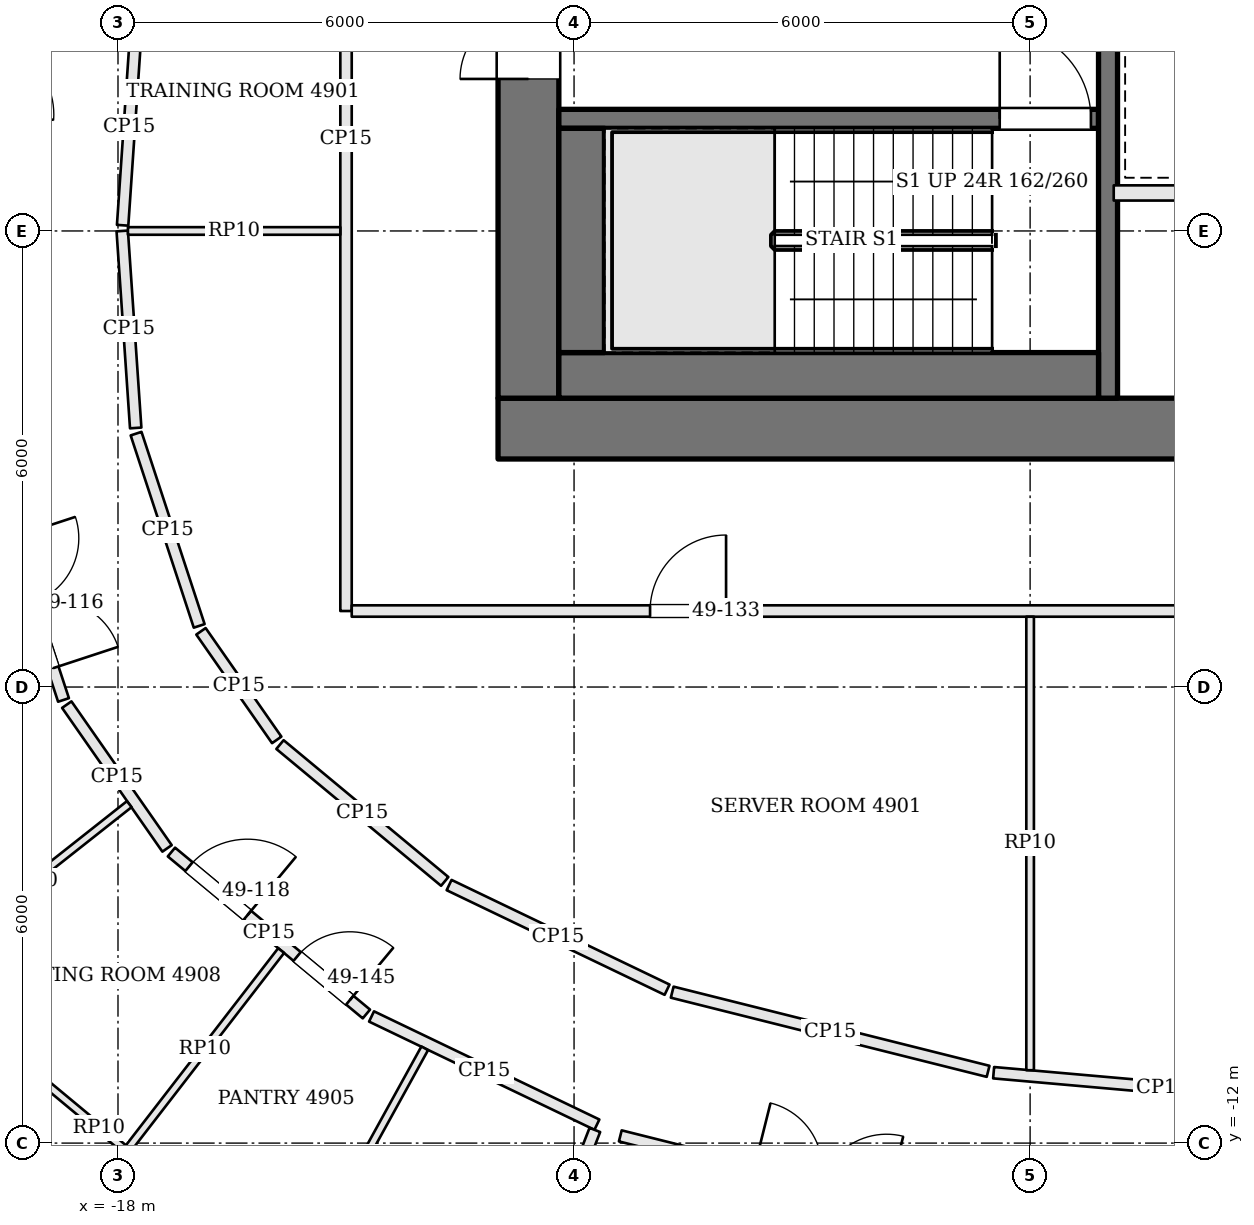
"""IFC4 building model, lengths in metres.
Left out: names, types, materials, properties, quantities, classifications, styles, units other than length and angle.
Written with IfcOpenShell. Run it as: python <this file> out.ifc"""

import sys

from ifc_helpers import new_model, si_unit, direction, frame, frame_2d, origin, place, context, subcontext, project, spatial, rectangle, extrude, element, fill, save


model = new_model("IFC4")
c1 = context("Model", 3, precision=1e-05, world=origin(), true_north=direction((0.0, 1.0)))
c2 = subcontext(c1, "Body", "Model", "MODEL_VIEW")
j1 = project(units=[si_unit("LENGTHUNIT", "METRE"), si_unit("PLANEANGLEUNIT", "RADIAN")], contexts=[c1])
p1 = place(None, origin())
s1 = spatial("IfcSite", under=j1, at=p1, CompositionType="ELEMENT")
p2 = place(p1, origin())
s2 = spatial("IfcBuilding", under=s1, at=p2, CompositionType="ELEMENT")
p3 = place(p2, frame((0.0, 0.0, 201.3)))
s3 = spatial("IfcBuildingStorey", under=s2, at=p3, CompositionType="ELEMENT", Elevation=201.3)
p4 = place(p3, frame((-13.0, -2.6, 0.0), z_axis=(0.0, 0.0, 1.0), x_axis=(1.0, 0.0, 0.0)))
e1 = element("IfcWall", 1, at=p4, inside=s3, PredefinedType="SHEAR", context=c2, shape_type="SweptSolid", body=[
    extrude(rectangle(XDim=26.0, YDim=0.8, at=frame_2d((13.0, 0.0))), origin(), (0.0, 0.0, 1.0), 3.9),
])
p5 = place(p4, frame((9.2, 0.0, 0.0)))
e2 = element("IfcOpeningElement", 2, at=p5, cuts=e1, PredefinedType="OPENING", context=c2, shape_type="SweptSolid", body=[
    extrude(rectangle(XDim=0.9, YDim=2.1, at=frame_2d((0.45, 1.05))), frame((0.0, 0.41, 0.0), z_axis=(0.0, -1.0, 0.0), x_axis=(1.0, 0.0, 0.0)), (0.0, 0.0, 1.0), 0.82),
])
p6 = place(p4, frame((12.3, 0.0, 0.0)))
e3 = element("IfcOpeningElement", 3, at=p6, cuts=e1, PredefinedType="OPENING", context=c2, shape_type="SweptSolid", body=[
    extrude(rectangle(XDim=0.9, YDim=2.1, at=frame_2d((0.45, 1.05))), frame((0.0, 0.41, 0.0), z_axis=(0.0, -1.0, 0.0), x_axis=(1.0, 0.0, 0.0)), (0.0, 0.0, 1.0), 0.82),
])
p7 = place(p4, frame((14.7, 0.0, 0.0)))
e4 = element("IfcOpeningElement", 4, at=p7, cuts=e1, PredefinedType="OPENING", context=c2, shape_type="SweptSolid", body=[
    extrude(rectangle(XDim=1.0, YDim=2.1, at=frame_2d((0.5, 1.05))), frame((0.0, 0.41, 0.0), z_axis=(0.0, -1.0, 0.0), x_axis=(1.0, 0.0, 0.0)), (0.0, 0.0, 1.0), 0.82),
])
p8 = place(p4, frame((16.55, 0.0, 0.0)))
e5 = element("IfcOpeningElement", 5, at=p8, cuts=e1, PredefinedType="OPENING", context=c2, shape_type="SweptSolid", body=[
    extrude(rectangle(XDim=0.9, YDim=2.1, at=frame_2d((0.45, 1.05))), frame((0.0, 0.41, 0.0), z_axis=(0.0, -1.0, 0.0), x_axis=(1.0, 0.0, 0.0)), (0.0, 0.0, 1.0), 0.82),
])
p9 = place(p3, frame((-12.6, -2.2, 0.0), z_axis=(0.0, 0.0, 1.0), x_axis=(0.0, 1.0, 0.0)))
e6 = element("IfcWall", 6, at=p9, inside=s3, PredefinedType="SHEAR", context=c2, shape_type="SweptSolid", body=[
    extrude(rectangle(XDim=13.4, YDim=0.8, at=frame_2d((6.7, 0.0))), origin(), (0.0, 0.0, 1.0), 3.9),
])
p10 = place(p9, frame((4.2, 0.0, 0.0)))
e7 = element("IfcOpeningElement", 7, at=p10, cuts=e6, PredefinedType="OPENING", context=c2, shape_type="SweptSolid", body=[
    extrude(rectangle(XDim=1.8, YDim=2.1, at=frame_2d((0.9, 1.05))), frame((0.0, 0.41, 0.0), z_axis=(0.0, -1.0, 0.0), x_axis=(1.0, 0.0, 0.0)), (0.0, 0.0, 1.0), 0.82),
])
p11 = place(p3, frame((-12.2, 1.475, 0.0), z_axis=(0.0, 0.0, 1.0), x_axis=(1.0, 0.0, 0.0)))
e8 = element("IfcWall", 8, at=p11, inside=s3, PredefinedType="SOLIDWALL", context=c2, shape_type="SweptSolid", body=[
    extrude(rectangle(XDim=7.1, YDim=0.25, at=frame_2d((3.55, 0.0))), origin(), (0.0, 0.0, 1.0), 3.7),
])
p12 = place(p11, frame((5.8, 0.0, 0.0)))
e9 = element("IfcOpeningElement", 9, at=p12, cuts=e8, PredefinedType="OPENING", context=c2, shape_type="SweptSolid", body=[
    extrude(rectangle(XDim=1.2, YDim=2.1, at=frame_2d((0.6, 1.05))), frame((0.0, 0.135, 0.0), z_axis=(0.0, -1.0, 0.0), x_axis=(1.0, 0.0, 0.0)), (0.0, 0.0, 1.0), 0.27),
])
p13 = place(p3, frame((-4.975, -2.2, 0.0), z_axis=(0.0, 0.0, 1.0), x_axis=(0.0, 1.0, 0.0)))
e10 = element("IfcWall", 10, at=p13, inside=s3, PredefinedType="SOLIDWALL", context=c2, shape_type="SweptSolid", body=[
    extrude(rectangle(XDim=13.4, YDim=0.25, at=frame_2d((6.7, 0.0))), origin(), (0.0, 0.0, 1.0), 3.7),
])
p14 = place(p13, frame((5.25, 0.0, 0.0)))
e11 = element("IfcOpeningElement", 11, at=p14, cuts=e10, PredefinedType="OPENING", context=c2, shape_type="SweptSolid", body=[
    extrude(rectangle(XDim=1.2, YDim=2.1, at=frame_2d((0.6, 1.05))), frame((0.0, 0.135, 0.0), z_axis=(0.0, -1.0, 0.0), x_axis=(1.0, 0.0, 0.0)), (0.0, 0.0, 1.0), 0.27),
])
p15 = place(p3, frame((-12.2, -1.9, 0.0), z_axis=(0.0, 0.0, 1.0), x_axis=(1.0, 0.0, 0.0)))
e12 = element("IfcWall", 12, at=p15, inside=s3, PredefinedType="SOLIDWALL", context=c2, shape_type="SweptSolid", body=[
    extrude(rectangle(XDim=7.1, YDim=0.6, at=frame_2d((3.55, 0.0))), origin(), (0.0, 0.0, 1.0), 3.7),
])
p16 = place(p3, frame((-11.9, -1.6, 0.0), z_axis=(0.0, 0.0, 1.0), x_axis=(0.0, 1.0, 0.0)))
e13 = element("IfcWall", 13, at=p16, inside=s3, PredefinedType="SOLIDWALL", context=c2, shape_type="SweptSolid", body=[
    extrude(rectangle(XDim=2.95, YDim=0.6, at=frame_2d((1.475, 0.0))), origin(), (0.0, 0.0, 1.0), 3.7),
])
p17 = place(p3, frame((-4.9, 0.5, 0.0), z_axis=(0.0, 0.0, 1.0), x_axis=(1.0, 0.0, 0.0)))
e14 = element("IfcWall", 14, at=p17, inside=s3, PredefinedType="SOLIDWALL", context=c2, shape_type="SweptSolid", body=[
    extrude(rectangle(XDim=9.8, YDim=0.2, at=frame_2d((4.9, 0.0))), origin(), (0.0, 0.0, 1.0), 3.7),
])
p18 = place(p3, frame((-19.712, -3.139, 0.0), z_axis=(0.0, 0.0, 1.0), x_axis=(0.311953946036, -0.950097224263, 0.0)))
e15 = element("IfcWall", 15, at=p18, inside=s3, PredefinedType="PARTITIONING", context=c2, shape_type="SweptSolid", body=[
    extrude(rectangle(XDim=3.19, YDim=0.15, at=frame_2d((1.595, 0.0))), origin(), (0.0, 0.0, 1.0), 3.084),
])
p19 = place(p18, frame((0.95, 0.0, 0.0)))
e16 = element("IfcOpeningElement", 16, at=p19, cuts=e15, PredefinedType="OPENING", context=c2, shape_type="SweptSolid", body=[
    extrude(rectangle(XDim=1.8, YDim=2.1, at=frame_2d((0.9, 1.05))), frame((0.0, 0.085, 0.0), z_axis=(0.0, -1.0, 0.0), x_axis=(1.0, 0.0, 0.0)), (0.0, 0.0, 1.0), 0.17),
])
p20 = place(p3, frame((-18.674, -6.232, 0.0), z_axis=(0.0, 0.0, 1.0), x_axis=(0.572118665737, -0.820170855563, 0.0)))
e17 = element("IfcWall", 17, at=p20, inside=s3, PredefinedType="PARTITIONING", context=c2, shape_type="SweptSolid", body=[
    extrude(rectangle(XDim=2.306, YDim=0.15, at=frame_2d((1.153, 0.0))), origin(), (0.0, 0.0, 1.0), 3.084),
])
p21 = place(p3, frame((-17.297, -8.171, 0.0), z_axis=(0.0, 0.0, 1.0), x_axis=(0.769228575061, -0.638973707839, 0.0)))
e18 = element("IfcWall", 18, at=p21, inside=s3, PredefinedType="PARTITIONING", context=c2, shape_type="SweptSolid", body=[
    extrude(rectangle(XDim=3.334, YDim=0.15, at=frame_2d((1.667, 0.0))), origin(), (0.0, 0.0, 1.0), 3.084),
])
p22 = place(p21, frame((0.3, 0.0, 0.0)))
e19 = element("IfcOpeningElement", 19, at=p22, cuts=e18, PredefinedType="OPENING", context=c2, shape_type="SweptSolid", body=[
    extrude(rectangle(XDim=1.0, YDim=2.4, at=frame_2d((0.5, 1.2))), frame((0.0, 0.085, 0.0), z_axis=(0.0, -1.0, 0.0), x_axis=(1.0, 0.0, 0.0)), (0.0, 0.0, 1.0), 0.17),
])
p23 = place(p21, frame((2.15, 0.0, 0.0)))
e20 = element("IfcOpeningElement", 20, at=p23, cuts=e18, PredefinedType="OPENING", context=c2, shape_type="SweptSolid", body=[
    extrude(rectangle(XDim=0.9, YDim=2.1, at=frame_2d((0.45, 1.05))), frame((0.0, 0.085, 0.0), z_axis=(0.0, -1.0, 0.0), x_axis=(1.0, 0.0, 0.0)), (0.0, 0.0, 1.0), 0.17),
])
p24 = place(p3, frame((-14.664, -10.334, 0.0), z_axis=(0.0, 0.0, 1.0), x_axis=(0.901511473943, -0.432755199101, 0.0)))
e21 = element("IfcWall", 21, at=p24, inside=s3, PredefinedType="PARTITIONING", context=c2, shape_type="SweptSolid", body=[
    extrude(rectangle(XDim=3.289, YDim=0.15, at=frame_2d((1.645, 0.0))), origin(), (0.0, 0.0, 1.0), 3.084),
])
p25 = place(p3, frame((-15.115, -20.562, 0.0), z_axis=(0.0, 0.0, 1.0), x_axis=(0.361729399691, 0.932283133709, 0.0)))
e22 = element("IfcWall", 22, at=p25, inside=s3, PredefinedType="PARTITIONING", context=c2, shape_type="SweptSolid", body=[
    extrude(rectangle(XDim=9.369, YDim=0.15, at=frame_2d((4.685, 0.0))), origin(), (0.0, 0.0, 1.0), 3.084),
])
p26 = place(p3, frame((-11.392, -11.905, 0.0), z_axis=(0.0, 0.0, 1.0), x_axis=(0.970002383823, -0.243095403859, 0.0)))
e23 = element("IfcWall", 23, at=p26, inside=s3, PredefinedType="PARTITIONING", context=c2, shape_type="SweptSolid", body=[
    extrude(rectangle(XDim=4.72, YDim=0.15, at=frame_2d((2.36, 0.0))), origin(), (0.0, 0.0, 1.0), 3.084),
])
p27 = place(p26, frame((1.812, 0.0, 0.0)))
e24 = element("IfcOpeningElement", 24, at=p27, cuts=e23, PredefinedType="OPENING", context=c2, shape_type="SweptSolid", body=[
    extrude(rectangle(XDim=1.8, YDim=2.1, at=frame_2d((0.9, 1.05))), frame((0.0, 0.085, 0.0), z_axis=(0.0, -1.0, 0.0), x_axis=(1.0, 0.0, 0.0)), (0.0, 0.0, 1.0), 0.17),
])
p28 = place(p3, frame((-2.039, -11.465, 0.0), z_axis=(0.0, 0.0, 1.0), x_axis=(-0.996139855484, 0.087780341286, 0.0)))
e25 = element("IfcWall", 25, at=p28, inside=s3, PredefinedType="PARTITIONING", context=c2, shape_type="SweptSolid", body=[
    extrude(rectangle(XDim=4.458, YDim=0.15, at=frame_2d((2.229, 0.0))), origin(), (0.0, 0.0, 1.0), 3.084),
])
p29 = place(p3, frame((-6.553, -11.056, 0.0), z_axis=(0.0, 0.0, 1.0), x_axis=(-0.970004917182, 0.243085294995, 0.0)))
e26 = element("IfcWall", 26, at=p29, inside=s3, PredefinedType="PARTITIONING", context=c2, shape_type="SweptSolid", body=[
    extrude(rectangle(XDim=4.284, YDim=0.15, at=frame_2d((2.142, 0.0))), origin(), (0.0, 0.0, 1.0), 3.084),
])
p30 = place(p3, frame((-10.776, -9.982, 0.0), z_axis=(0.0, 0.0, 1.0), x_axis=(-0.901511079436, 0.432756020933, 0.0)))
e27 = element("IfcWall", 27, at=p30, inside=s3, PredefinedType="PARTITIONING", context=c2, shape_type="SweptSolid", body=[
    extrude(rectangle(XDim=3.181, YDim=0.15, at=frame_2d((1.59, 0.0))), origin(), (0.0, 0.0, 1.0), 3.084),
])
p31 = place(p3, frame((-13.702, -8.557, 0.0), z_axis=(0.0, 0.0, 1.0), x_axis=(-0.769221825067, 0.638981833733, 0.0)))
e28 = element("IfcWall", 28, at=p31, inside=s3, PredefinedType="PARTITIONING", context=c2, shape_type="SweptSolid", body=[
    extrude(rectangle(XDim=2.817, YDim=0.15, at=frame_2d((1.409, 0.0))), origin(), (0.0, 0.0, 1.0), 3.084),
])
p32 = place(p3, frame((-15.912, -6.696, 0.0), z_axis=(0.0, 0.0, 1.0), x_axis=(-0.572078533763, 0.820198848578, 0.0)))
e29 = element("IfcWall", 29, at=p32, inside=s3, PredefinedType="PARTITIONING", context=c2, shape_type="SweptSolid", body=[
    extrude(rectangle(XDim=1.742, YDim=0.15, at=frame_2d((0.871, 0.0))), origin(), (0.0, 0.0, 1.0), 3.084),
])
p33 = place(p3, frame((-16.932, -5.196, 0.0), z_axis=(0.0, 0.0, 1.0), x_axis=(-0.311904957484, 0.950113307715, 0.0)))
e30 = element("IfcWall", 30, at=p33, inside=s3, PredefinedType="PARTITIONING", context=c2, shape_type="SweptSolid", body=[
    extrude(rectangle(XDim=2.662, YDim=0.15, at=frame_2d((1.331, 0.0))), origin(), (0.0, 0.0, 1.0), 3.084),
])
p34 = place(p3, frame((-17.767, -2.592, 0.0), z_axis=(0.0, 0.0, 1.0), x_axis=(-0.068140828228, 0.997675712608, 0.0)))
e31 = element("IfcWall", 31, at=p34, inside=s3, PredefinedType="PARTITIONING", context=c2, shape_type="SweptSolid", body=[
    extrude(rectangle(XDim=2.598, YDim=0.15, at=frame_2d((1.299, 0.0))), origin(), (0.0, 0.0, 1.0), 3.084),
])
p35 = place(p3, frame((-17.939, 0.075, 0.0), z_axis=(0.0, 0.0, 1.0), x_axis=(0.068227980697, 0.997669756307, 0.0)))
e32 = element("IfcWall", 32, at=p35, inside=s3, PredefinedType="PARTITIONING", context=c2, shape_type="SweptSolid", body=[
    extrude(rectangle(XDim=2.598, YDim=0.15, at=frame_2d((1.299, 0.0))), origin(), (0.0, 0.0, 1.0), 3.084),
])
p36 = place(p3, frame((-15.0, 7.423, 0.0), z_axis=(0.0, 0.0, 1.0), x_axis=(0.0, -1.0, 0.0)))
e33 = element("IfcWall", 33, at=p36, inside=s3, PredefinedType="PARTITIONING", context=c2, shape_type="SweptSolid", body=[
    extrude(rectangle(XDim=12.423, YDim=0.15, at=frame_2d((6.211, 0.0))), origin(), (0.0, 0.0, 1.0), 3.084),
])
p37 = place(p36, frame((3.174, 0.0, 0.0)))
e34 = element("IfcOpeningElement", 34, at=p37, cuts=e33, PredefinedType="OPENING", context=c2, shape_type="SweptSolid", body=[
    extrude(rectangle(XDim=1.0, YDim=2.1, at=frame_2d((0.5, 1.05))), frame((0.0, 0.085, 0.0), z_axis=(0.0, -1.0, 0.0), x_axis=(1.0, 0.0, 0.0)), (0.0, 0.0, 1.0), 0.17),
])
p38 = place(p3, frame((-14.925, -5.0, 0.0), z_axis=(0.0, 0.0, 1.0), x_axis=(1.0, 0.0, 0.0)))
e35 = element("IfcWall", 35, at=p38, inside=s3, PredefinedType="PARTITIONING", context=c2, shape_type="SweptSolid", body=[
    extrude(rectangle(XDim=29.925, YDim=0.15, at=frame_2d((14.962, 0.0))), origin(), (0.0, 0.0, 1.0), 3.084),
])
p39 = place(p38, frame((3.925, 0.0, 0.0)))
e36 = element("IfcOpeningElement", 36, at=p39, cuts=e35, PredefinedType="OPENING", context=c2, shape_type="SweptSolid", body=[
    extrude(rectangle(XDim=1.0, YDim=2.1, at=frame_2d((0.5, 1.05))), frame((0.0, 0.085, 0.0), z_axis=(0.0, -1.0, 0.0), x_axis=(1.0, 0.0, 0.0)), (0.0, 0.0, 1.0), 0.17),
])
p40 = place(p38, frame((14.025, 0.0, 0.0)))
e37 = element("IfcOpeningElement", 37, at=p40, cuts=e35, PredefinedType="OPENING", context=c2, shape_type="SweptSolid", body=[
    extrude(rectangle(XDim=1.8, YDim=2.1, at=frame_2d((0.9, 1.05))), frame((0.0, 0.085, 0.0), z_axis=(0.0, -1.0, 0.0), x_axis=(1.0, 0.0, 0.0)), (0.0, 0.0, 1.0), 0.17),
])
p41 = place(p38, frame((24.925, 0.0, 0.0)))
e38 = element("IfcOpeningElement", 38, at=p41, cuts=e35, PredefinedType="OPENING", context=c2, shape_type="SweptSolid", body=[
    extrude(rectangle(XDim=1.0, YDim=2.1, at=frame_2d((0.5, 1.05))), frame((0.0, 0.085, 0.0), z_axis=(0.0, -1.0, 0.0), x_axis=(1.0, 0.0, 0.0)), (0.0, 0.0, 1.0), 0.17),
])
p42 = place(p3, frame((-16.62, -13.153, 0.0), z_axis=(0.0, 0.0, 1.0), x_axis=(-0.76922129881, 0.638982467253, 0.0)))
e39 = element("IfcWall", 39, at=p42, inside=s3, PredefinedType="PARTITIONING", context=c2, shape_type="SweptSolid", body=[
    extrude(rectangle(XDim=4.238, YDim=0.1, at=frame_2d((2.119, 0.0))), origin(), (0.0, 0.0, 1.0), 3.084),
])
p43 = place(p3, frame((-17.852, -7.541, 0.0), z_axis=(0.0, 0.0, 1.0), x_axis=(-0.784859909174, -0.61967323887, 0.0)))
e40 = element("IfcWall", 40, at=p43, inside=s3, PredefinedType="PARTITIONING", context=c2, shape_type="SweptSolid", body=[
    extrude(rectangle(XDim=3.281, YDim=0.1, at=frame_2d((1.641, 0.0))), origin(), (0.0, 0.0, 1.0), 3.084),
])
p44 = place(p3, frame((-15.854, -9.467, 0.0), z_axis=(0.0, 0.0, 1.0), x_axis=(-0.611487785641, -0.791253870772, 0.0)))
e41 = element("IfcWall", 41, at=p44, inside=s3, PredefinedType="PARTITIONING", context=c2, shape_type="SweptSolid", body=[
    extrude(rectangle(XDim=3.277, YDim=0.1, at=frame_2d((1.639, 0.0))), origin(), (0.0, 0.0, 1.0), 3.084),
])
p45 = place(p3, frame((-13.965, -10.753, 0.0), z_axis=(0.0, 0.0, 1.0), x_axis=(-0.48287271045, -0.875690553508, 0.0)))
e42 = element("IfcWall", 42, at=p45, inside=s3, PredefinedType="PARTITIONING", context=c2, shape_type="SweptSolid", body=[
    extrude(rectangle(XDim=3.28, YDim=0.1, at=frame_2d((1.64, 0.0))), origin(), (0.0, 0.0, 1.0), 3.084),
])
p46 = place(p3, frame((-6.0, -11.041, 0.0), z_axis=(0.0, 0.0, 1.0), x_axis=(0.0, 1.0, 0.0)))
e43 = element("IfcWall", 43, at=p46, inside=s3, PredefinedType="PARTITIONING", context=c2, shape_type="SweptSolid", body=[
    extrude(rectangle(XDim=5.966, YDim=0.1, at=frame_2d((2.983, 0.0))), origin(), (0.0, 0.0, 1.0), 3.084),
])
p47 = place(p3, frame((-17.869, 0.0, 0.0), z_axis=(0.0, 0.0, 1.0), x_axis=(1.0, 0.0, 0.0)))
e44 = element("IfcWall", 44, at=p47, inside=s3, PredefinedType="PARTITIONING", context=c2, shape_type="SweptSolid", body=[
    extrude(rectangle(XDim=2.794, YDim=0.1, at=frame_2d((1.397, 0.0))), origin(), (0.0, 0.0, 1.0), 3.084),
])
p48 = place(p10, origin())
e45 = element("IfcDoor", 45, at=p48, inside=s3, OperationType="DOUBLE_DOOR_SINGLE_SWING", PredefinedType="DOOR", context=c2, shape_type="SweptSolid", body=[
    extrude(rectangle(XDim=1.8, YDim=2.1, at=frame_2d((0.9, 1.05))), frame((0.0, 0.025, 0.0), z_axis=(0.0, -1.0, 0.0), x_axis=(1.0, 0.0, 0.0)), (0.0, 0.0, 1.0), 0.05),
])
fill(e7, e45)
p49 = place(p12, origin())
e46 = element("IfcDoor", 46, at=p49, inside=s3, OperationType="SINGLE_SWING_LEFT", PredefinedType="DOOR", context=c2, shape_type="SweptSolid", body=[
    extrude(rectangle(XDim=1.2, YDim=2.1, at=frame_2d((0.6, 1.05))), frame((0.0, 0.025, 0.0), z_axis=(0.0, -1.0, 0.0), x_axis=(1.0, 0.0, 0.0)), (0.0, 0.0, 1.0), 0.05),
])
fill(e9, e46)
p50 = place(p19, origin())
e47 = element("IfcDoor", 47, at=p50, inside=s3, OperationType="DOUBLE_DOOR_SINGLE_SWING", PredefinedType="DOOR", context=c2, shape_type="SweptSolid", body=[
    extrude(rectangle(XDim=1.8, YDim=2.1, at=frame_2d((0.9, 1.05))), frame((0.0, 0.025, 0.0), z_axis=(0.0, -1.0, 0.0), x_axis=(1.0, 0.0, 0.0)), (0.0, 0.0, 1.0), 0.05),
])
fill(e16, e47)
p51 = place(p22, origin())
e48 = element("IfcDoor", 48, at=p51, inside=s3, OperationType="SINGLE_SWING_RIGHT", PredefinedType="DOOR", context=c2, shape_type="SweptSolid", body=[
    extrude(rectangle(XDim=1.0, YDim=2.4, at=frame_2d((0.5, 1.2))), frame((0.0, 0.025, 0.0), z_axis=(0.0, -1.0, 0.0), x_axis=(1.0, 0.0, 0.0)), (0.0, 0.0, 1.0), 0.05),
])
fill(e19, e48)
p52 = place(p39, origin())
e49 = element("IfcDoor", 49, at=p52, inside=s3, OperationType="SINGLE_SWING_RIGHT", PredefinedType="DOOR", context=c2, shape_type="SweptSolid", body=[
    extrude(rectangle(XDim=1.0, YDim=2.1, at=frame_2d((0.5, 1.05))), frame((0.0, 0.025, 0.0), z_axis=(0.0, -1.0, 0.0), x_axis=(1.0, 0.0, 0.0)), (0.0, 0.0, 1.0), 0.05),
])
fill(e36, e49)
p53 = place(p23, origin())
e50 = element("IfcDoor", 50, at=p53, inside=s3, OperationType="SINGLE_SWING_RIGHT", PredefinedType="DOOR", context=c2, shape_type="SweptSolid", body=[
    extrude(rectangle(XDim=0.9, YDim=2.1, at=frame_2d((0.45, 1.05))), frame((0.0, 0.025, 0.0), z_axis=(0.0, -1.0, 0.0), x_axis=(1.0, 0.0, 0.0)), (0.0, 0.0, 1.0), 0.05),
])
fill(e20, e50)
save(model, sys.argv[1])
